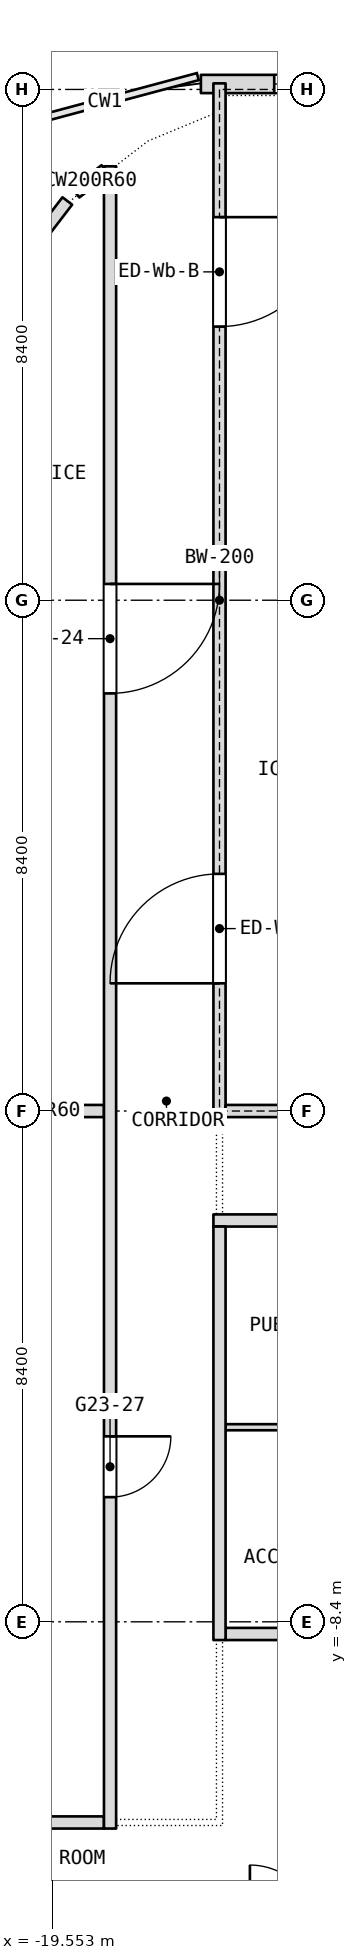
"""IFC4 building model, lengths in metres.
Left out: names, types, materials, properties, quantities, classifications, styles, units other than length and angle.
Written with IfcOpenShell. Run it as: python <this file> out.ifc"""

import sys

from ifc_helpers import new_model, si_unit, direction, frame, frame_2d, origin, place, context, subcontext, project, spatial, rectangle, extrude, element, fill, save


model = new_model("IFC4")
c1 = context("Model", 3, precision=1e-05, world=origin(), true_north=direction((0.0, 1.0)))
c2 = subcontext(c1, "Body", "Model", "MODEL_VIEW")
j1 = project(units=[si_unit("LENGTHUNIT", "METRE"), si_unit("PLANEANGLEUNIT", "RADIAN")], contexts=[c1])
p1 = place(None, origin())
s1 = spatial("IfcSite", under=j1, at=p1, CompositionType="ELEMENT")
p2 = place(p1, origin())
s2 = spatial("IfcBuilding", under=s1, at=p2, CompositionType="ELEMENT")
p3 = place(p2, frame((0.0, 0.0, 270.5)))
s3 = spatial("IfcBuildingStorey", under=s2, at=p3, CompositionType="ELEMENT", Elevation=270.5)
p4 = place(p3, frame((-21.0, -11.7, 0.0), z_axis=(0.0, 0.0, 1.0), x_axis=(1.0, 0.0, 0.0)))
e1 = element("IfcWall", 1, at=p4, inside=s3, PredefinedType="PARTITIONING", context=c2, shape_type="SweptSolid", body=[
    extrude(rectangle(XDim=2.3, YDim=0.2, at=frame_2d((1.15, 0.0))), origin(), (0.0, 0.0, 1.0), 3.34),
])
p5 = place(p3, frame((-16.7, -8.6, 0.0), z_axis=(0.0, 0.0, 1.0), x_axis=(1.0, 0.0, 0.0)))
e2 = element("IfcWall", 2, at=p5, inside=s3, PredefinedType="PARTITIONING", context=c2, shape_type="SweptSolid", body=[
    extrude(rectangle(XDim=8.4, YDim=0.2, at=frame_2d((4.2, 0.0))), origin(), (0.0, 0.0, 1.0), 3.34),
])
p6 = place(p3, frame((-16.7, -5.2, 0.0), z_axis=(0.0, 0.0, 1.0), x_axis=(1.0, 0.0, 0.0)))
e3 = element("IfcWall", 3, at=p6, inside=s3, PredefinedType="PARTITIONING", context=c2, shape_type="SweptSolid", body=[
    extrude(rectangle(XDim=4.2, YDim=0.1, at=frame_2d((2.1, 0.0))), origin(), (0.0, 0.0, 1.0), 3.34),
])
p7 = place(p6, frame((1.55, 0.0, 0.0)))
e4 = element("IfcOpeningElement", 4, at=p7, cuts=e3, PredefinedType="OPENING", context=c2, shape_type="SweptSolid", body=[
    extrude(rectangle(XDim=0.9, YDim=2.1, at=frame_2d((0.45, 1.05))), frame((0.0, 0.05, 0.0), z_axis=(0.0, -1.0, 0.0), x_axis=(1.0, 0.0, 0.0)), (0.0, 0.0, 1.0), 0.1),
])
p8 = place(p3, frame((-16.9, -1.8, 0.0), z_axis=(0.0, 0.0, 1.0), x_axis=(1.0, 0.0, 0.0)))
e5 = element("IfcWall", 5, at=p8, inside=s3, PredefinedType="PARTITIONING", context=c2, shape_type="SweptSolid", body=[
    extrude(rectangle(XDim=33.8, YDim=0.2, at=frame_2d((16.9, 0.0))), origin(), (0.0, 0.0, 1.0), 3.34),
])
p9 = place(p8, frame((1.7, 0.0, 0.0)))
e6 = element("IfcOpeningElement", 6, at=p9, cuts=e5, PredefinedType="OPENING", context=c2, shape_type="SweptSolid", body=[
    extrude(rectangle(XDim=1.0, YDim=2.1, at=frame_2d((0.5, 1.05))), frame((0.0, 0.1, 0.0), z_axis=(0.0, -1.0, 0.0), x_axis=(1.0, 0.0, 0.0)), (0.0, 0.0, 1.0), 0.2),
])
p10 = place(p8, frame((5.9, 0.0, 0.0)))
e7 = element("IfcOpeningElement", 7, at=p10, cuts=e5, PredefinedType="OPENING", context=c2, shape_type="SweptSolid", body=[
    extrude(rectangle(XDim=1.0, YDim=2.1, at=frame_2d((0.5, 1.05))), frame((0.0, 0.1, 0.0), z_axis=(0.0, -1.0, 0.0), x_axis=(1.0, 0.0, 0.0)), (0.0, 0.0, 1.0), 0.2),
])
p11 = place(p8, frame((10.1, 0.0, 0.0)))
e8 = element("IfcOpeningElement", 8, at=p11, cuts=e5, PredefinedType="OPENING", context=c2, shape_type="SweptSolid", body=[
    extrude(rectangle(XDim=1.0, YDim=2.1, at=frame_2d((0.5, 1.05))), frame((0.0, 0.1, 0.0), z_axis=(0.0, -1.0, 0.0), x_axis=(1.0, 0.0, 0.0)), (0.0, 0.0, 1.0), 0.2),
])
p12 = place(p8, frame((16.0, 0.0, 0.0)))
e9 = element("IfcOpeningElement", 9, at=p12, cuts=e5, PredefinedType="OPENING", context=c2, shape_type="SweptSolid", body=[
    extrude(rectangle(XDim=1.8, YDim=2.1, at=frame_2d((0.9, 1.05))), frame((0.0, 0.1, 0.0), z_axis=(0.0, -1.0, 0.0), x_axis=(1.0, 0.0, 0.0)), (0.0, 0.0, 1.0), 0.2),
])
p13 = place(p8, frame((22.7, 0.0, 0.0)))
e10 = element("IfcOpeningElement", 10, at=p13, cuts=e5, PredefinedType="OPENING", context=c2, shape_type="SweptSolid", body=[
    extrude(rectangle(XDim=1.0, YDim=2.1, at=frame_2d((0.5, 1.05))), frame((0.0, 0.1, 0.0), z_axis=(0.0, -1.0, 0.0), x_axis=(1.0, 0.0, 0.0)), (0.0, 0.0, 1.0), 0.2),
])
p14 = place(p8, frame((26.9, 0.0, 0.0)))
e11 = element("IfcOpeningElement", 11, at=p14, cuts=e5, PredefinedType="OPENING", context=c2, shape_type="SweptSolid", body=[
    extrude(rectangle(XDim=1.0, YDim=2.1, at=frame_2d((0.5, 1.05))), frame((0.0, 0.1, 0.0), z_axis=(0.0, -1.0, 0.0), x_axis=(1.0, 0.0, 0.0)), (0.0, 0.0, 1.0), 0.2),
])
p15 = place(p8, frame((31.1, 0.0, 0.0)))
e12 = element("IfcOpeningElement", 12, at=p15, cuts=e5, PredefinedType="OPENING", context=c2, shape_type="SweptSolid", body=[
    extrude(rectangle(XDim=1.0, YDim=2.1, at=frame_2d((0.5, 1.05))), frame((0.0, 0.1, 0.0), z_axis=(0.0, -1.0, 0.0), x_axis=(1.0, 0.0, 0.0)), (0.0, 0.0, 1.0), 0.2),
])
p16 = place(p3, frame((-21.0, 0.0, 0.0), z_axis=(0.0, 0.0, 1.0), x_axis=(1.0, 0.0, 0.0)))
e13 = element("IfcWall", 13, at=p16, inside=s3, PredefinedType="PARTITIONING", context=c2, shape_type="SweptSolid", body=[
    extrude(rectangle(XDim=2.3, YDim=0.2, at=frame_2d((1.15, 0.0))), origin(), (0.0, 0.0, 1.0), 3.0),
])
p17 = place(p3, frame((-16.8, -8.7, 0.0), z_axis=(0.0, 0.0, 1.0), x_axis=(0.0, 1.0, 0.0)))
e14 = element("IfcWall", 14, at=p17, inside=s3, PredefinedType="PARTITIONING", context=c2, shape_type="SweptSolid", body=[
    extrude(rectangle(XDim=6.8, YDim=0.2, at=frame_2d((3.4, 0.0))), origin(), (0.0, 0.0, 1.0), 3.34),
])
p18 = place(p3, frame((-18.6, -11.8, 0.0), z_axis=(0.0, 0.0, 1.0), x_axis=(0.0, 1.0, 0.0)))
e15 = element("IfcWall", 15, at=p18, inside=s3, PredefinedType="PARTITIONING", context=c2, shape_type="SweptSolid", body=[
    extrude(rectangle(XDim=27.336, YDim=0.2, at=frame_2d((13.668, 0.0))), origin(), (0.0, 0.0, 1.0), 3.34),
])
p19 = place(p18, frame((18.668, 0.0, 0.0)))
e16 = element("IfcOpeningElement", 16, at=p19, cuts=e15, PredefinedType="OPENING", context=c2, shape_type="SweptSolid", body=[
    extrude(rectangle(XDim=1.8, YDim=2.1, at=frame_2d((0.9, 1.05))), frame((0.0, 0.1, 0.0), z_axis=(0.0, -1.0, 0.0), x_axis=(1.0, 0.0, 0.0)), (0.0, 0.0, 1.0), 0.2),
])
p20 = place(p18, frame((5.45, 0.0, 0.0)))
e17 = element("IfcOpeningElement", 17, at=p20, cuts=e15, PredefinedType="OPENING", context=c2, shape_type="SweptSolid", body=[
    extrude(rectangle(XDim=1.0, YDim=2.1, at=frame_2d((0.5, 1.05))), frame((0.0, 0.1, 0.0), z_axis=(0.0, -1.0, 0.0), x_axis=(1.0, 0.0, 0.0)), (0.0, 0.0, 1.0), 0.2),
])
p21 = place(p3, frame((-19.166, 15.103, 0.0), z_axis=(0.0, 0.0, 1.0), x_axis=(0.794663000987, 0.607050833837, 0.0)))
e18 = element("IfcWall", 18, at=p21, inside=s3, PredefinedType="PARTITIONING", context=c2, shape_type="SweptSolid", body=[
    extrude(rectangle(XDim=0.613, YDim=0.2, at=frame_2d((0.306, 0.0))), origin(), (0.0, 0.0, 1.0), 3.34),
])
p22 = place(p3, frame((-19.956, 14.112, 0.0), z_axis=(0.0, 0.0, 1.0), x_axis=(0.607458536541, 0.794351387223, 0.0)))
e19 = element("IfcWall", 19, at=p22, inside=s3, PredefinedType="PARTITIONING", context=c2, shape_type="SweptSolid", body=[
    extrude(rectangle(XDim=1.075, YDim=0.2, at=frame_2d((0.538, 0.0))), origin(), (0.0, 0.0, 1.0), 3.34),
])
p23 = place(p3, frame((-12.6, 16.89, 0.0), z_axis=(0.0, 0.0, 1.0), x_axis=(-1.0, 0.0, 0.0)))
e20 = element("IfcWall", 20, at=p23, inside=s3, PredefinedType="NOTDEFINED", context=c2, shape_type="SweptSolid", body=[
    extrude(rectangle(XDim=4.506, YDim=0.3, at=frame_2d((2.253, 0.0))), origin(), (0.0, 0.0, 1.0), 3.6),
])
p24 = place(p23, frame((0.9, 0.0, 0.9)))
e21 = element("IfcOpeningElement", 21, at=p24, cuts=e20, PredefinedType="OPENING", context=c2, shape_type="SweptSolid", body=[
    extrude(rectangle(XDim=2.4, YDim=2.1, at=frame_2d((1.2, 1.05))), frame((0.0, 0.15, 0.0), z_axis=(0.0, -1.0, 0.0), x_axis=(1.0, 0.0, 0.0)), (0.0, 0.0, 1.0), 0.3),
])
p25 = place(p3, frame((-16.8, -0.1, 0.0), z_axis=(0.0, 0.0, 1.0), x_axis=(0.0, 1.0, 0.0)))
e22 = element("IfcWall", 22, at=p25, inside=s3, PredefinedType="PARTITIONING", context=c2, shape_type="SweptSolid", body=[
    extrude(rectangle(XDim=17.0, YDim=0.2, at=frame_2d((8.5, 0.0))), origin(), (0.0, 0.0, 1.0), 3.34),
])
p26 = place(p25, frame((2.2, 0.0, 0.0)))
e23 = element("IfcOpeningElement", 23, at=p26, cuts=e22, PredefinedType="OPENING", context=c2, shape_type="SweptSolid", body=[
    extrude(rectangle(XDim=1.8, YDim=2.1, at=frame_2d((0.9, 1.05))), frame((0.0, 0.1, 0.0), z_axis=(0.0, -1.0, 0.0), x_axis=(1.0, 0.0, 0.0)), (0.0, 0.0, 1.0), 0.2),
])
p27 = place(p25, frame((13.0, 0.0, 0.0)))
e24 = element("IfcOpeningElement", 24, at=p27, cuts=e22, PredefinedType="OPENING", context=c2, shape_type="SweptSolid", body=[
    extrude(rectangle(XDim=1.8, YDim=2.1, at=frame_2d((0.9, 1.05))), frame((0.0, 0.1, 0.0), z_axis=(0.0, -1.0, 0.0), x_axis=(1.0, 0.0, 0.0)), (0.0, 0.0, 1.0), 0.2),
])
p28 = place(p3, frame((-16.7, 0.0, 0.0), z_axis=(0.0, 0.0, 1.0), x_axis=(1.0, 0.0, 0.0)))
e25 = element("IfcWall", 25, at=p28, inside=s3, PredefinedType="PARTITIONING", context=c2, shape_type="SweptSolid", body=[
    extrude(rectangle(XDim=5.0, YDim=0.2, at=frame_2d((2.5, 0.0))), origin(), (0.0, 0.0, 1.0), 3.0),
])
p29 = place(p19, origin())
e26 = element("IfcDoor", 26, at=p29, inside=s3, OperationType="DOUBLE_DOOR_SINGLE_SWING", PredefinedType="DOOR", context=c2, shape_type="SweptSolid", body=[
    extrude(rectangle(XDim=1.8, YDim=2.1, at=frame_2d((0.9, 1.05))), frame((0.0, 0.025, 0.0), z_axis=(0.0, -1.0, 0.0), x_axis=(1.0, 0.0, 0.0)), (0.0, 0.0, 1.0), 0.05),
])
fill(e16, e26)
p30 = place(p20, origin())
e27 = element("IfcDoor", 27, at=p30, inside=s3, OperationType="SINGLE_SWING_LEFT", PredefinedType="DOOR", context=c2, shape_type="SweptSolid", body=[
    extrude(rectangle(XDim=1.0, YDim=2.1, at=frame_2d((0.5, 1.05))), frame((0.0, 0.025, 0.0), z_axis=(0.0, -1.0, 0.0), x_axis=(1.0, 0.0, 0.0)), (0.0, 0.0, 1.0), 0.05),
])
fill(e17, e27)
p31 = place(p24, origin())
e28 = element("IfcWindow", 28, at=p31, inside=s3, PartitioningType="SINGLE_PANEL", PredefinedType="WINDOW", context=c2, shape_type="SweptSolid", body=[
    extrude(rectangle(XDim=2.4, YDim=2.1, at=frame_2d((1.2, 1.05))), frame((0.0, 0.03, 0.0), z_axis=(0.0, -1.0, 0.0), x_axis=(1.0, 0.0, 0.0)), (0.0, 0.0, 1.0), 0.06),
])
fill(e21, e28)
p32 = place(p26, origin())
e29 = element("IfcDoor", 29, at=p32, inside=s3, OperationType="DOUBLE_DOOR_SINGLE_SWING", PredefinedType="DOOR", context=c2, shape_type="SweptSolid", body=[
    extrude(rectangle(XDim=1.8, YDim=2.1, at=frame_2d((0.9, 1.05))), frame((0.0, 0.025, 0.0), z_axis=(0.0, -1.0, 0.0), x_axis=(1.0, 0.0, 0.0)), (0.0, 0.0, 1.0), 0.05),
])
fill(e23, e29)
p33 = place(p27, origin())
e30 = element("IfcDoor", 30, at=p33, inside=s3, OperationType="DOUBLE_DOOR_SINGLE_SWING", PredefinedType="DOOR", context=c2, shape_type="SweptSolid", body=[
    extrude(rectangle(XDim=1.8, YDim=2.1, at=frame_2d((0.9, 1.05))), frame((0.0, 0.025, 0.0), z_axis=(0.0, -1.0, 0.0), x_axis=(1.0, 0.0, 0.0)), (0.0, 0.0, 1.0), 0.05),
])
fill(e24, e30)
save(model, sys.argv[1])
